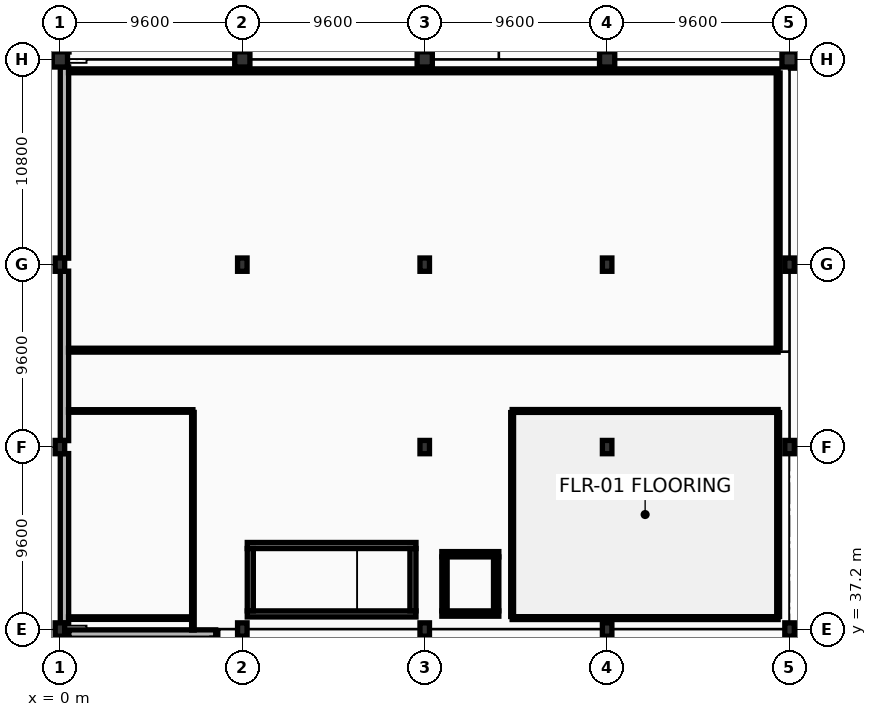
"""IFC4 building model, lengths in metres.
Left out: names, types, materials, properties, quantities, classifications, styles, units other than length and angle.
Written with IfcOpenShell. Run it as: python <this file> out.ifc"""

import sys

from ifc_helpers import new_model, si_unit, direction, frame, frame_2d, origin, origin_2d, place, context, subcontext, project, spatial, rectangle, extrude, element, fill, save


model = new_model("IFC4")
c1 = context("Model", 3, precision=1e-05, world=origin(), true_north=direction((0.0, 1.0)))
c2 = subcontext(c1, "Body", "Model", "MODEL_VIEW")
j1 = project(units=[si_unit("LENGTHUNIT", "METRE"), si_unit("PLANEANGLEUNIT", "RADIAN")], contexts=[c1])
p1 = place(None, origin())
s1 = spatial("IfcSite", under=j1, at=p1, CompositionType="ELEMENT")
p2 = place(p1, origin())
s2 = spatial("IfcBuilding", under=s1, at=p2, CompositionType="ELEMENT")
p3 = place(p2, origin())
s3 = spatial("IfcBuildingStorey", under=s2, at=p3, CompositionType="ELEMENT", Elevation=0.0)
for number, where, z_axis, x_axis in (
    (1, (0.0, 67.2, 0.0), (0.0, 0.0, 1.0), (1.0, 0.0, 0.0)),
    (2, (9.6, 67.2, 0.0), (0.0, 0.0, 1.0), (1.0, 0.0, 0.0)),
    (3, (19.2, 67.2, 0.0), (0.0, 0.0, 1.0), (1.0, 0.0, 0.0)),
    (4, (28.8, 67.2, 0.0), (0.0, 0.0, 1.0), (1.0, 0.0, 0.0)),
    (5, (38.4, 67.2, 0.0), (0.0, 0.0, 1.0), (1.0, 0.0, 0.0)),
):
    element("IfcColumn", number, at=place(p3, frame(where, z_axis=z_axis, x_axis=x_axis)), inside=s3, PredefinedType="COLUMN", context=c2, shape_type="SweptSolid", body=[
        extrude(rectangle(XDim=0.8, YDim=0.8, at=origin_2d()), origin(), (0.0, 0.0, 1.0), 5.4),
    ])
for number, where, z_axis, x_axis in (
    (6, (0.0, 37.2, 0.0), (0.0, 0.0, 1.0), (1.0, 0.0, 0.0)),
    (7, (0.0, 46.8, 0.0), (0.0, 0.0, 1.0), (1.0, 0.0, 0.0)),
    (8, (0.0, 56.4, 0.0), (0.0, 0.0, 1.0), (1.0, 0.0, 0.0)),
    (9, (9.6, 37.2, 0.0), (0.0, 0.0, 1.0), (1.0, 0.0, 0.0)),
    (10, (9.6, 56.4, 0.0), (0.0, 0.0, 1.0), (1.0, 0.0, 0.0)),
    (11, (19.2, 37.2, 0.0), (0.0, 0.0, 1.0), (1.0, 0.0, 0.0)),
    (12, (19.2, 46.8, 0.0), (0.0, 0.0, 1.0), (1.0, 0.0, 0.0)),
    (13, (19.2, 56.4, 0.0), (0.0, 0.0, 1.0), (1.0, 0.0, 0.0)),
    (14, (28.8, 37.2, 0.0), (0.0, 0.0, 1.0), (1.0, 0.0, 0.0)),
    (15, (28.8, 46.8, 0.0), (0.0, 0.0, 1.0), (1.0, 0.0, 0.0)),
    (16, (28.8, 56.4, 0.0), (0.0, 0.0, 1.0), (1.0, 0.0, 0.0)),
    (17, (38.4, 37.2, 0.0), (0.0, 0.0, 1.0), (1.0, 0.0, 0.0)),
    (18, (38.4, 46.8, 0.0), (0.0, 0.0, 1.0), (1.0, 0.0, 0.0)),
    (19, (38.4, 56.4, 0.0), (0.0, 0.0, 1.0), (1.0, 0.0, 0.0)),
):
    element("IfcColumn", number, at=place(p3, frame(where, z_axis=z_axis, x_axis=x_axis)), inside=s3, PredefinedType="COLUMN", context=c2, shape_type="SweptSolid", body=[
        extrude(rectangle(XDim=0.5, YDim=0.7, at=origin_2d()), origin(), (0.0, 0.0, 1.0), 5.4),
    ])
p4 = place(p3, frame((0.24, 67.592, 0.0), z_axis=(0.0, 0.0, 1.0), x_axis=(0.0, 1.0, 0.0)))
e20 = element("IfcWall", 20, at=p4, inside=s3, PredefinedType="STANDARD", context=c2, shape_type="SweptSolid", body=[
    extrude(rectangle(XDim=6.416, YDim=0.48, at=frame_2d((3.208, 0.0))), origin(), (0.0, 0.0, 1.0), 4.28),
])
p5 = place(p4, frame((1.253, 0.0, 0.85)))
e21 = element("IfcOpeningElement", 21, at=p5, cuts=e20, PredefinedType="OPENING", context=c2, shape_type="SweptSolid", body=[
    extrude(rectangle(XDim=1.7, YDim=2.3, at=frame_2d((0.85, 1.15))), frame((0.0, 0.25, 0.0), z_axis=(0.0, -1.0, 0.0), x_axis=(1.0, 0.0, 0.0)), (0.0, 0.0, 1.0), 0.5),
])
p6 = place(p4, frame((3.703, 0.0, 0.85)))
e22 = element("IfcOpeningElement", 22, at=p6, cuts=e20, PredefinedType="OPENING", context=c2, shape_type="SweptSolid", body=[
    extrude(rectangle(XDim=1.7, YDim=2.3, at=frame_2d((0.85, 1.15))), frame((0.0, 0.25, 0.0), z_axis=(0.0, -1.0, 0.0), x_axis=(1.0, 0.0, 0.0)), (0.0, 0.0, 1.0), 0.5),
])
p7 = place(p3, frame((0.24, 37.542, 0.0), z_axis=(0.0, 0.0, 1.0), x_axis=(0.0, 1.0, 0.0)))
e23 = element("IfcWall", 23, at=p7, inside=s3, PredefinedType="STANDARD", context=c2, shape_type="SweptSolid", body=[
    extrude(rectangle(XDim=8.916, YDim=0.44, at=frame_2d((4.458, 0.0))), origin(), (0.0, 0.0, 1.0), 4.28),
])
p8 = place(p7, frame((1.308, 0.0, 0.9)))
e24 = element("IfcOpeningElement", 24, at=p8, cuts=e23, PredefinedType="OPENING", context=c2, shape_type="SweptSolid", body=[
    extrude(rectangle(XDim=1.3, YDim=2.1, at=frame_2d((0.65, 1.05))), frame((0.0, 0.23, 0.0), z_axis=(0.0, -1.0, 0.0), x_axis=(1.0, 0.0, 0.0)), (0.0, 0.0, 1.0), 0.46),
])
p9 = place(p7, frame((3.808, 0.0, 0.9)))
e25 = element("IfcOpeningElement", 25, at=p9, cuts=e23, PredefinedType="OPENING", context=c2, shape_type="SweptSolid", body=[
    extrude(rectangle(XDim=1.3, YDim=2.1, at=frame_2d((0.65, 1.05))), frame((0.0, 0.23, 0.0), z_axis=(0.0, -1.0, 0.0), x_axis=(1.0, 0.0, 0.0)), (0.0, 0.0, 1.0), 0.46),
])
p10 = place(p7, frame((6.308, 0.0, 0.9)))
e26 = element("IfcOpeningElement", 26, at=p10, cuts=e23, PredefinedType="OPENING", context=c2, shape_type="SweptSolid", body=[
    extrude(rectangle(XDim=1.3, YDim=2.1, at=frame_2d((0.65, 1.05))), frame((0.0, 0.23, 0.0), z_axis=(0.0, -1.0, 0.0), x_axis=(1.0, 0.0, 0.0)), (0.0, 0.0, 1.0), 0.46),
])
p11 = place(p3, frame((0.24, 47.142, 0.0), z_axis=(0.0, 0.0, 1.0), x_axis=(0.0, 1.0, 0.0)))
e27 = element("IfcWall", 27, at=p11, inside=s3, PredefinedType="STANDARD", context=c2, shape_type="SweptSolid", body=[
    extrude(rectangle(XDim=8.916, YDim=0.44, at=frame_2d((4.458, 0.0))), origin(), (0.0, 0.0, 1.0), 4.28),
])
p12 = place(p11, frame((2.258, 0.0, 0.0)))
e28 = element("IfcOpeningElement", 28, at=p12, cuts=e27, PredefinedType="OPENING", context=c2, shape_type="SweptSolid", body=[
    extrude(rectangle(XDim=1.8, YDim=2.25, at=frame_2d((0.9, 1.125))), frame((0.0, 0.23, 0.0), z_axis=(0.0, -1.0, 0.0), x_axis=(1.0, 0.0, 0.0)), (0.0, 0.0, 1.0), 0.46),
])
p13 = place(p3, frame((0.24, 56.742, 0.0), z_axis=(0.0, 0.0, 1.0), x_axis=(0.0, 1.0, 0.0)))
e29 = element("IfcWall", 29, at=p13, inside=s3, PredefinedType="STANDARD", context=c2, shape_type="SweptSolid", body=[
    extrude(rectangle(XDim=10.066, YDim=0.44, at=frame_2d((5.033, 0.0))), origin(), (0.0, 0.0, 1.0), 4.28),
])
p14 = place(p13, frame((1.508, 0.0, 0.9)))
e30 = element("IfcOpeningElement", 30, at=p14, cuts=e29, PredefinedType="OPENING", context=c2, shape_type="SweptSolid", body=[
    extrude(rectangle(XDim=1.3, YDim=2.1, at=frame_2d((0.65, 1.05))), frame((0.0, 0.23, 0.0), z_axis=(0.0, -1.0, 0.0), x_axis=(1.0, 0.0, 0.0)), (0.0, 0.0, 1.0), 0.46),
])
p15 = place(p13, frame((4.408, 0.0, 0.9)))
e31 = element("IfcOpeningElement", 31, at=p15, cuts=e29, PredefinedType="OPENING", context=c2, shape_type="SweptSolid", body=[
    extrude(rectangle(XDim=1.3, YDim=2.1, at=frame_2d((0.65, 1.05))), frame((0.0, 0.23, 0.0), z_axis=(0.0, -1.0, 0.0), x_axis=(1.0, 0.0, 0.0)), (0.0, 0.0, 1.0), 0.46),
])
p16 = place(p13, frame((7.308, 0.0, 0.9)))
e32 = element("IfcOpeningElement", 32, at=p16, cuts=e29, PredefinedType="OPENING", context=c2, shape_type="SweptSolid", body=[
    extrude(rectangle(XDim=1.3, YDim=2.1, at=frame_2d((0.65, 1.05))), frame((0.0, 0.23, 0.0), z_axis=(0.0, -1.0, 0.0), x_axis=(1.0, 0.0, 0.0)), (0.0, 0.0, 1.0), 0.46),
])
p17 = place(p3, frame((0.24, 29.142, 0.0), z_axis=(0.0, 0.0, 1.0), x_axis=(0.0, 1.0, 0.0)))
e33 = element("IfcWall", 33, at=p17, inside=s3, PredefinedType="STANDARD", context=c2, shape_type="SweptSolid", body=[
    extrude(rectangle(XDim=7.716, YDim=0.48, at=frame_2d((3.858, 0.0))), origin(), (0.0, 0.0, 1.0), 4.28),
])
p18 = place(p17, frame((2.458, 0.0, 0.0)))
e34 = element("IfcOpeningElement", 34, at=p18, cuts=e33, PredefinedType="OPENING", context=c2, shape_type="SweptSolid", body=[
    extrude(rectangle(XDim=1.1, YDim=2.15, at=frame_2d((0.55, 1.075))), frame((0.0, 0.25, 0.0), z_axis=(0.0, -1.0, 0.0), x_axis=(1.0, 0.0, 0.0)), (0.0, 0.0, 1.0), 0.5),
])
p19 = place(p3, frame((0.472, 36.96, 0.0), z_axis=(0.0, 0.0, 1.0), x_axis=(1.0, 0.0, 0.0)))
e35 = element("IfcWall", 35, at=p19, inside=s3, PredefinedType="STANDARD", context=c2, shape_type="SweptSolid", body=[
    extrude(rectangle(XDim=7.728, YDim=0.44, at=frame_2d((3.864, 0.0))), origin(), (0.0, 0.0, 1.0), 4.28),
])
p20 = place(p3, frame((38.45, 36.98, 0.0), z_axis=(0.0, 0.0, 1.0), x_axis=(1.0, 0.0, 0.0)))
e36 = element("IfcWall", 36, at=p20, inside=s3, PredefinedType="STANDARD", context=c2, shape_type="SweptSolid", body=[
    extrude(rectangle(XDim=16.55, YDim=0.44, at=frame_2d((8.275, 0.0))), origin(), (0.0, 0.0, 1.0), 4.28),
])
p21 = place(p3, frame((38.45, 66.96, 0.0), z_axis=(0.0, 0.0, 1.0), x_axis=(1.0, 0.0, 0.0)))
e37 = element("IfcWall", 37, at=p21, inside=s3, PredefinedType="STANDARD", context=c2, shape_type="SweptSolid", body=[
    extrude(rectangle(XDim=7.55, YDim=0.44, at=frame_2d((3.775, 0.0))), origin(), (0.0, 0.0, 1.0), 4.13),
])
for number, where, z_axis, x_axis in (
    (38, (9.86, 41.62, 0.0), (0.0, 0.0, 1.0), (1.0, 0.0, 0.0)),
    (39, (18.74, 38.02, 0.0), (0.0, 0.0, 1.0), (-1.0, 0.0, 0.0)),
):
    element("IfcWall", number, at=place(p3, frame(where, z_axis=z_axis, x_axis=x_axis)), inside=s3, PredefinedType="SHEAR", context=c2, shape_type="SweptSolid", body=[
        extrude(rectangle(XDim=8.88, YDim=0.32, at=frame_2d((4.44, 0.0))), origin(), (0.0, 0.0, 1.0), 5.14),
    ])
p22 = place(p3, frame((10.02, 38.18, 0.0), z_axis=(0.0, 0.0, 1.0), x_axis=(0.0, 1.0, 0.0)))
e40 = element("IfcWall", 40, at=p22, inside=s3, PredefinedType="SHEAR", context=c2, shape_type="SweptSolid", body=[
    extrude(rectangle(XDim=3.28, YDim=0.32, at=frame_2d((1.64, 0.0))), origin(), (0.0, 0.0, 1.0), 5.14),
])
p23 = place(p22, frame((1.065, 0.0, 0.0)))
e41 = element("IfcOpeningElement", 41, at=p23, cuts=e40, PredefinedType="OPENING", context=c2, shape_type="SweptSolid", body=[
    extrude(rectangle(XDim=1.15, YDim=2.2, at=frame_2d((0.575, 1.1))), frame((0.0, 0.17, 0.0), z_axis=(0.0, -1.0, 0.0), x_axis=(1.0, 0.0, 0.0)), (0.0, 0.0, 1.0), 0.34),
])
p24 = place(p3, frame((18.58, 41.46, 0.0), z_axis=(0.0, 0.0, 1.0), x_axis=(0.0, -1.0, 0.0)))
e42 = element("IfcWall", 42, at=p24, inside=s3, PredefinedType="SHEAR", context=c2, shape_type="SweptSolid", body=[
    extrude(rectangle(XDim=3.28, YDim=0.32, at=frame_2d((1.64, 0.0))), origin(), (0.0, 0.0, 1.0), 5.14),
])
p25 = place(p3, frame((20.1, 41.16, 0.0), z_axis=(0.0, 0.0, 1.0), x_axis=(1.0, 0.0, 0.0)))
e43 = element("IfcWall", 43, at=p25, inside=s3, PredefinedType="SHEAR", context=c2, shape_type="SweptSolid", body=[
    extrude(rectangle(XDim=3.0, YDim=0.28, at=frame_2d((1.5, 0.0))), origin(), (0.0, 0.0, 1.0), 5.14),
])
p26 = place(p25, frame((0.975, 0.0, 0.0)))
e44 = element("IfcOpeningElement", 44, at=p26, cuts=e43, PredefinedType="OPENING", context=c2, shape_type="SweptSolid", body=[
    extrude(rectangle(XDim=1.05, YDim=2.2, at=frame_2d((0.525, 1.1))), frame((0.0, 0.15, 0.0), z_axis=(0.0, -1.0, 0.0), x_axis=(1.0, 0.0, 0.0)), (0.0, 0.0, 1.0), 0.3),
])
p27 = place(p3, frame((23.1, 38.04, 0.0), z_axis=(0.0, 0.0, 1.0), x_axis=(-1.0, 0.0, 0.0)))
e45 = element("IfcWall", 45, at=p27, inside=s3, PredefinedType="SHEAR", context=c2, shape_type="SweptSolid", body=[
    extrude(rectangle(XDim=3.0, YDim=0.28, at=frame_2d((1.5, 0.0))), origin(), (0.0, 0.0, 1.0), 5.14),
])
for number, where, z_axis, x_axis in (
    (46, (20.24, 38.18, 0.0), (0.0, 0.0, 1.0), (0.0, 1.0, 0.0)),
    (47, (22.96, 41.02, 0.0), (0.0, 0.0, 1.0), (0.0, -1.0, 0.0)),
):
    element("IfcWall", number, at=place(p3, frame(where, z_axis=z_axis, x_axis=x_axis)), inside=s3, PredefinedType="SHEAR", context=c2, shape_type="SweptSolid", body=[
        extrude(rectangle(XDim=2.84, YDim=0.28, at=frame_2d((1.42, 0.0))), origin(), (0.0, 0.0, 1.0), 5.14),
    ])
p28 = place(p3, frame((0.454, 66.6, 0.0), z_axis=(0.0, 0.0, 1.0), x_axis=(1.0, 0.0, 0.0)))
e48 = element("IfcWall", 48, at=p28, inside=s3, PredefinedType="STANDARD", context=c2, shape_type="SweptSolid", body=[
    extrude(rectangle(XDim=37.346, YDim=0.205, at=frame_2d((18.673, 0.0))), origin(), (0.0, 0.0, 1.0), 4.28),
])
p29 = place(p3, frame((37.8, 51.9, 0.0), z_axis=(0.0, 0.0, 1.0), x_axis=(-1.0, 0.0, 0.0)))
e49 = element("IfcWall", 49, at=p29, inside=s3, PredefinedType="STANDARD", context=c2, shape_type="SweptSolid", body=[
    extrude(rectangle(XDim=37.346, YDim=0.205, at=frame_2d((18.673, 0.0))), origin(), (0.0, 0.0, 1.0), 4.13),
])
p30 = place(p29, frame((2.112, 0.0, 0.0)))
e50 = element("IfcOpeningElement", 50, at=p30, cuts=e49, PredefinedType="OPENING", context=c2, shape_type="SweptSolid", body=[
    extrude(rectangle(XDim=1.4, YDim=2.25, at=frame_2d((0.7, 1.125))), frame((0.0, 0.113, 0.0), z_axis=(0.0, -1.0, 0.0), x_axis=(1.0, 0.0, 0.0)), (0.0, 0.0, 1.0), 0.225),
])
p31 = place(p3, frame((37.8, 66.488, 0.0), z_axis=(0.0, 0.0, 1.0), x_axis=(0.0, -1.0, 0.0)))
e51 = element("IfcWall", 51, at=p31, inside=s3, PredefinedType="STANDARD", context=c2, shape_type="SweptSolid", body=[
    extrude(rectangle(XDim=14.475, YDim=0.205, at=frame_2d((7.238, 0.0))), origin(), (0.0, 0.0, 1.0), 4.33),
])
p32 = place(p3, frame((0.454, 48.7, 0.0), z_axis=(0.0, 0.0, 1.0), x_axis=(1.0, 0.0, 0.0)))
e52 = element("IfcWall", 52, at=p32, inside=s3, PredefinedType="PARTITIONING", context=c2, shape_type="SweptSolid", body=[
    extrude(rectangle(XDim=6.546, YDim=0.135, at=frame_2d((3.273, 0.0))), origin(), (0.0, 0.0, 1.0), 4.28),
])
p33 = place(p32, frame((2.064, 0.0, 0.0)))
e53 = element("IfcOpeningElement", 53, at=p33, cuts=e52, PredefinedType="OPENING", context=c2, shape_type="SweptSolid", body=[
    extrude(rectangle(XDim=0.95, YDim=2.15, at=frame_2d((0.475, 1.075))), frame((0.0, 0.077, 0.0), z_axis=(0.0, -1.0, 0.0), x_axis=(1.0, 0.0, 0.0)), (0.0, 0.0, 1.0), 0.155),
])
p34 = place(p3, frame((7.0, 37.8, 0.0), z_axis=(0.0, 0.0, 1.0), x_axis=(-1.0, 0.0, 0.0)))
e54 = element("IfcWall", 54, at=p34, inside=s3, PredefinedType="PARTITIONING", context=c2, shape_type="SweptSolid", body=[
    extrude(rectangle(XDim=6.546, YDim=0.135, at=frame_2d((3.273, 0.0))), origin(), (0.0, 0.0, 1.0), 4.28),
])
p35 = place(p3, frame((7.0, 48.623, 0.0), z_axis=(0.0, 0.0, 1.0), x_axis=(0.0, -1.0, 0.0)))
e55 = element("IfcWall", 55, at=p35, inside=s3, PredefinedType="PARTITIONING", context=c2, shape_type="SweptSolid", body=[
    extrude(rectangle(XDim=11.448, YDim=0.135, at=frame_2d((5.724, 0.0))), origin(), (0.0, 0.0, 1.0), 4.33),
])
p36 = place(p3, frame((23.8, 48.7, 0.0), z_axis=(0.0, 0.0, 1.0), x_axis=(1.0, 0.0, 0.0)))
e56 = element("IfcWall", 56, at=p36, inside=s3, PredefinedType="PARTITIONING", context=c2, shape_type="SweptSolid", body=[
    extrude(rectangle(XDim=14.0, YDim=0.15, at=frame_2d((7.0, 0.0))), origin(), (0.0, 0.0, 1.0), 4.28),
])
p37 = place(p36, frame((7.43, 0.0, 0.0)))
e57 = element("IfcOpeningElement", 57, at=p37, cuts=e56, PredefinedType="OPENING", context=c2, shape_type="SweptSolid", body=[
    extrude(rectangle(XDim=1.5, YDim=2.35, at=frame_2d((0.75, 1.175))), frame((0.0, 0.085, 0.0), z_axis=(0.0, -1.0, 0.0), x_axis=(1.0, 0.0, 0.0)), (0.0, 0.0, 1.0), 0.17),
])
p38 = place(p3, frame((37.8, 37.8, 0.0), z_axis=(0.0, 0.0, 1.0), x_axis=(-1.0, 0.0, 0.0)))
e58 = element("IfcWall", 58, at=p38, inside=s3, PredefinedType="PARTITIONING", context=c2, shape_type="SweptSolid", body=[
    extrude(rectangle(XDim=14.0, YDim=0.15, at=frame_2d((7.0, 0.0))), origin(), (0.0, 0.0, 1.0), 4.28),
])
for number, where, z_axis, x_axis in (
    (59, (23.8, 37.885, 0.0), (0.0, 0.0, 1.0), (0.0, 1.0, 0.0)),
    (60, (37.8, 48.615, 0.0), (0.0, 0.0, 1.0), (0.0, -1.0, 0.0)),
):
    element("IfcWall", number, at=place(p3, frame(where, z_axis=z_axis, x_axis=x_axis)), inside=s3, PredefinedType="PARTITIONING", context=c2, shape_type="SweptSolid", body=[
        extrude(rectangle(XDim=10.73, YDim=0.15, at=frame_2d((5.365, 0.0))), origin(), (0.0, 0.0, 1.0), 4.33),
    ])
p39 = place(p8, origin())
e61 = element("IfcWindow", 61, at=p39, inside=s3, PartitioningType="SINGLE_PANEL", PredefinedType="WINDOW", context=c2, shape_type="SweptSolid", body=[
    extrude(rectangle(XDim=1.3, YDim=2.1, at=frame_2d((0.65, 1.05))), frame((0.0, 0.03, 0.0), z_axis=(0.0, -1.0, 0.0), x_axis=(1.0, 0.0, 0.0)), (0.0, 0.0, 1.0), 0.06),
])
fill(e24, e61)
p40 = place(p9, origin())
e62 = element("IfcWindow", 62, at=p40, inside=s3, PartitioningType="SINGLE_PANEL", PredefinedType="WINDOW", context=c2, shape_type="SweptSolid", body=[
    extrude(rectangle(XDim=1.3, YDim=2.1, at=frame_2d((0.65, 1.05))), frame((0.0, 0.03, 0.0), z_axis=(0.0, -1.0, 0.0), x_axis=(1.0, 0.0, 0.0)), (0.0, 0.0, 1.0), 0.06),
])
fill(e25, e62)
p41 = place(p10, origin())
e63 = element("IfcWindow", 63, at=p41, inside=s3, PartitioningType="SINGLE_PANEL", PredefinedType="WINDOW", context=c2, shape_type="SweptSolid", body=[
    extrude(rectangle(XDim=1.3, YDim=2.1, at=frame_2d((0.65, 1.05))), frame((0.0, 0.03, 0.0), z_axis=(0.0, -1.0, 0.0), x_axis=(1.0, 0.0, 0.0)), (0.0, 0.0, 1.0), 0.06),
])
fill(e26, e63)
p42 = place(p12, origin())
e64 = element("IfcDoor", 64, at=p42, inside=s3, OperationType="DOUBLE_DOOR_SINGLE_SWING", PredefinedType="DOOR", context=c2, shape_type="SweptSolid", body=[
    extrude(rectangle(XDim=1.8, YDim=2.25, at=frame_2d((0.9, 1.125))), frame((0.0, 0.025, 0.0), z_axis=(0.0, -1.0, 0.0), x_axis=(1.0, 0.0, 0.0)), (0.0, 0.0, 1.0), 0.05),
])
fill(e28, e64)
p43 = place(p14, origin())
e65 = element("IfcWindow", 65, at=p43, inside=s3, PartitioningType="SINGLE_PANEL", PredefinedType="WINDOW", context=c2, shape_type="SweptSolid", body=[
    extrude(rectangle(XDim=1.3, YDim=2.1, at=frame_2d((0.65, 1.05))), frame((0.0, 0.03, 0.0), z_axis=(0.0, -1.0, 0.0), x_axis=(1.0, 0.0, 0.0)), (0.0, 0.0, 1.0), 0.06),
])
fill(e30, e65)
p44 = place(p15, origin())
e66 = element("IfcWindow", 66, at=p44, inside=s3, PartitioningType="SINGLE_PANEL", PredefinedType="WINDOW", context=c2, shape_type="SweptSolid", body=[
    extrude(rectangle(XDim=1.3, YDim=2.1, at=frame_2d((0.65, 1.05))), frame((0.0, 0.03, 0.0), z_axis=(0.0, -1.0, 0.0), x_axis=(1.0, 0.0, 0.0)), (0.0, 0.0, 1.0), 0.06),
])
fill(e31, e66)
p45 = place(p16, origin())
e67 = element("IfcWindow", 67, at=p45, inside=s3, PartitioningType="SINGLE_PANEL", PredefinedType="WINDOW", context=c2, shape_type="SweptSolid", body=[
    extrude(rectangle(XDim=1.3, YDim=2.1, at=frame_2d((0.65, 1.05))), frame((0.0, 0.03, 0.0), z_axis=(0.0, -1.0, 0.0), x_axis=(1.0, 0.0, 0.0)), (0.0, 0.0, 1.0), 0.06),
])
fill(e32, e67)
p46 = place(p23, origin())
e68 = element("IfcDoor", 68, at=p46, inside=s3, OperationType="SINGLE_SWING_RIGHT", PredefinedType="DOOR", context=c2, shape_type="SweptSolid", body=[
    extrude(rectangle(XDim=1.15, YDim=2.2, at=frame_2d((0.575, 1.1))), frame((0.0, 0.025, 0.0), z_axis=(0.0, -1.0, 0.0), x_axis=(1.0, 0.0, 0.0)), (0.0, 0.0, 1.0), 0.05),
])
fill(e41, e68)
p47 = place(p26, origin())
e69 = element("IfcDoor", 69, at=p47, inside=s3, OperationType="DOUBLE_DOOR_SLIDING", PredefinedType="DOOR", context=c2, shape_type="SweptSolid", body=[
    extrude(rectangle(XDim=1.05, YDim=2.2, at=frame_2d((0.525, 1.1))), frame((0.0, 0.025, 0.0), z_axis=(0.0, -1.0, 0.0), x_axis=(1.0, 0.0, 0.0)), (0.0, 0.0, 1.0), 0.05),
])
fill(e44, e69)
p48 = place(p30, origin())
e70 = element("IfcDoor", 70, at=p48, inside=s3, OperationType="SINGLE_SWING_RIGHT", PredefinedType="DOOR", context=c2, shape_type="SweptSolid", body=[
    extrude(rectangle(XDim=1.4, YDim=2.25, at=frame_2d((0.7, 1.125))), frame((0.0, 0.025, 0.0), z_axis=(0.0, -1.0, 0.0), x_axis=(1.0, 0.0, 0.0)), (0.0, 0.0, 1.0), 0.05),
])
fill(e50, e70)
p49 = place(p33, origin())
e71 = element("IfcDoor", 71, at=p49, inside=s3, OperationType="SINGLE_SWING_LEFT", PredefinedType="DOOR", context=c2, shape_type="SweptSolid", body=[
    extrude(rectangle(XDim=0.95, YDim=2.15, at=frame_2d((0.475, 1.075))), frame((0.0, 0.025, 0.0), z_axis=(0.0, -1.0, 0.0), x_axis=(1.0, 0.0, 0.0)), (0.0, 0.0, 1.0), 0.05),
])
fill(e53, e71)
p50 = place(p37, origin())
e72 = element("IfcDoor", 72, at=p50, inside=s3, OperationType="DOUBLE_DOOR_SINGLE_SWING", PredefinedType="DOOR", context=c2, shape_type="SweptSolid", body=[
    extrude(rectangle(XDim=1.5, YDim=2.35, at=frame_2d((0.75, 1.175))), frame((0.0, 0.025, 0.0), z_axis=(0.0, -1.0, 0.0), x_axis=(1.0, 0.0, 0.0)), (0.0, 0.0, 1.0), 0.05),
])
fill(e57, e72)
save(model, sys.argv[1])
